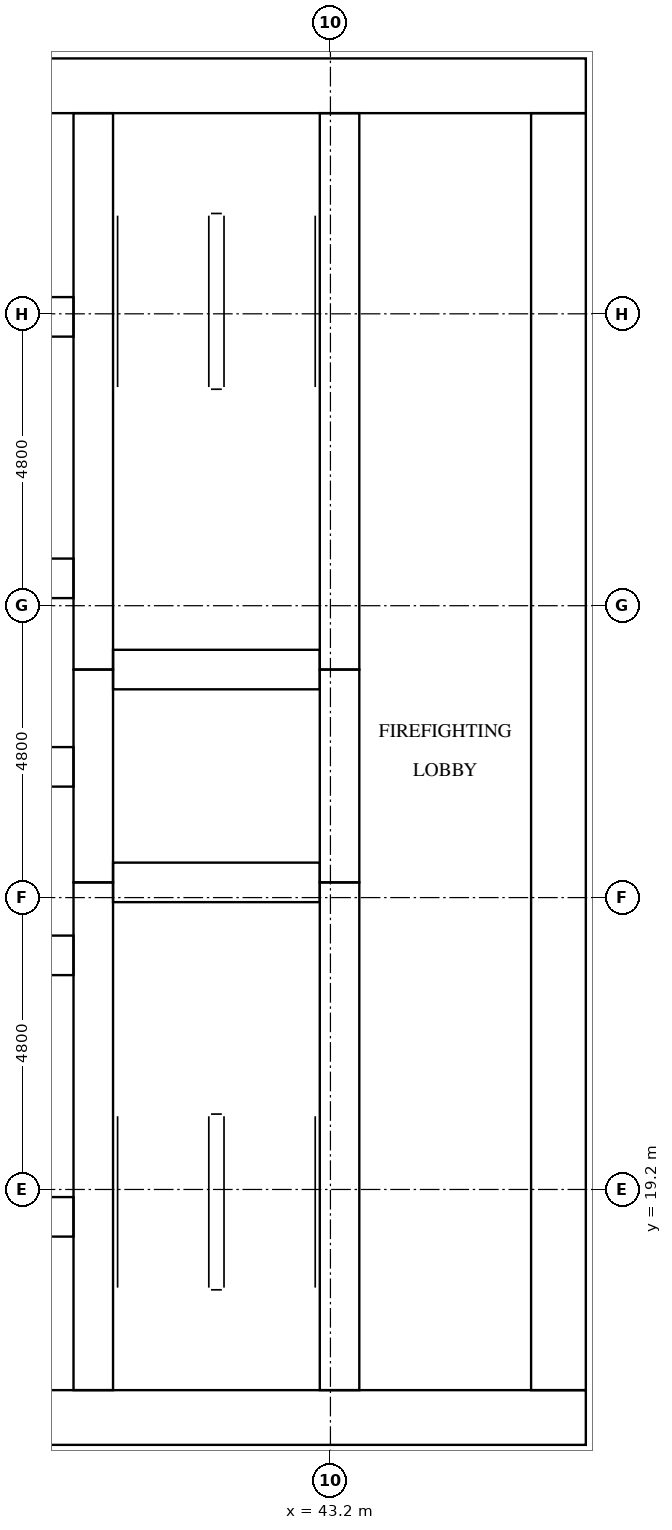
"""IFC4 building model, lengths in metres.
Left out: names, types, materials, properties, quantities, classifications, styles, units other than length and angle.
Written with IfcOpenShell. Run it as: python <this file> out.ifc"""

import sys

from ifc_helpers import new_model, si_unit, direction, frame, frame_2d, origin, place, context, subcontext, project, spatial, rectangle, extrude, element, fill, save


model = new_model("IFC4")
c1 = context("Model", 3, precision=1e-05, world=origin(), true_north=direction((0.0, 1.0)))
c2 = subcontext(c1, "Body", "Model", "MODEL_VIEW")
j1 = project(units=[si_unit("LENGTHUNIT", "METRE"), si_unit("PLANEANGLEUNIT", "RADIAN")], contexts=[c1])
p1 = place(None, origin())
s1 = spatial("IfcSite", under=j1, at=p1, CompositionType="ELEMENT")
p2 = place(p1, origin())
s2 = spatial("IfcBuilding", under=s1, at=p2, CompositionType="ELEMENT")
p3 = place(p2, frame((0.0, 0.0, 62.8)))
s3 = spatial("IfcBuildingStorey", under=s2, at=p3, CompositionType="ELEMENT", Elevation=62.8)
p4 = place(p3, frame((15.0, 15.45, 0.0), z_axis=(0.0, 0.0, 1.0), x_axis=(1.0, 0.0, 0.0)))
e1 = element("IfcWall", 1, at=p4, inside=s3, PredefinedType="SHEAR", context=c2, shape_type="SweptSolid", body=[
    extrude(rectangle(XDim=32.4, YDim=0.9, at=frame_2d((16.2, 0.0))), origin(), (0.0, 0.0, 1.0), 3.2),
])
p5 = place(p4, frame((15.3, 0.0, 0.0)))
e2 = element("IfcOpeningElement", 2, at=p5, cuts=e1, PredefinedType="OPENING", context=c2, shape_type="SweptSolid", body=[
    extrude(rectangle(XDim=1.8, YDim=2.1, at=frame_2d((0.9, 1.05))), frame((0.0, 0.46, 0.0), z_axis=(0.0, -1.0, 0.0), x_axis=(1.0, 0.0, 0.0)), (0.0, 0.0, 1.0), 0.92),
])
p6 = place(p3, frame((15.0, 37.35, 0.0), z_axis=(0.0, 0.0, 1.0), x_axis=(1.0, 0.0, 0.0)))
e3 = element("IfcWall", 3, at=p6, inside=s3, PredefinedType="SHEAR", context=c2, shape_type="SweptSolid", body=[
    extrude(rectangle(XDim=32.4, YDim=0.9, at=frame_2d((16.2, 0.0))), origin(), (0.0, 0.0, 1.0), 3.2),
])
p7 = place(p6, frame((15.3, 0.0, 0.0)))
e4 = element("IfcOpeningElement", 4, at=p7, cuts=e3, PredefinedType="OPENING", context=c2, shape_type="SweptSolid", body=[
    extrude(rectangle(XDim=1.8, YDim=2.1, at=frame_2d((0.9, 1.05))), frame((0.0, 0.46, 0.0), z_axis=(0.0, -1.0, 0.0), x_axis=(1.0, 0.0, 0.0)), (0.0, 0.0, 1.0), 0.92),
])
p8 = place(p6, frame((1.794, 0.0, 0.0)))
e5 = element("IfcOpeningElement", 5, at=p8, cuts=e3, PredefinedType="OPENING", context=c2, shape_type="SweptSolid", body=[
    extrude(rectangle(XDim=1.0, YDim=2.1, at=frame_2d((0.5, 1.05))), frame((0.0, 0.46, 0.0), z_axis=(0.0, -1.0, 0.0), x_axis=(1.0, 0.0, 0.0)), (0.0, 0.0, 1.0), 0.92),
])
p9 = place(p6, frame((5.331, 0.0, 0.0)))
e6 = element("IfcOpeningElement", 6, at=p9, cuts=e3, PredefinedType="OPENING", context=c2, shape_type="SweptSolid", body=[
    extrude(rectangle(XDim=1.0, YDim=2.1, at=frame_2d((0.5, 1.05))), frame((0.0, 0.46, 0.0), z_axis=(0.0, -1.0, 0.0), x_axis=(1.0, 0.0, 0.0)), (0.0, 0.0, 1.0), 0.92),
])
p10 = place(p3, frame((46.95, 15.9, 0.0), z_axis=(0.0, 0.0, 1.0), x_axis=(0.0, 1.0, 0.0)))
e7 = element("IfcWall", 7, at=p10, inside=s3, PredefinedType="SHEAR", context=c2, shape_type="SweptSolid", body=[
    extrude(rectangle(XDim=21.0, YDim=0.9, at=frame_2d((10.5, 0.0))), origin(), (0.0, 0.0, 1.0), 3.2),
])
p11 = place(p10, frame((10.2, 0.0, 0.0)))
e8 = element("IfcOpeningElement", 8, at=p11, cuts=e7, PredefinedType="OPENING", context=c2, shape_type="SweptSolid", body=[
    extrude(rectangle(XDim=1.2, YDim=2.1, at=frame_2d((0.6, 1.05))), frame((0.0, 0.46, 0.0), z_axis=(0.0, -1.0, 0.0), x_axis=(1.0, 0.0, 0.0)), (0.0, 0.0, 1.0), 0.92),
])
p12 = place(p3, frame((39.3, 15.9, 0.0), z_axis=(0.0, 0.0, 1.0), x_axis=(0.0, 1.0, 0.0)))
e9 = element("IfcWall", 9, at=p12, inside=s3, PredefinedType="SHEAR", context=c2, shape_type="SweptSolid", body=[
    extrude(rectangle(XDim=8.35, YDim=0.65, at=frame_2d((4.175, 0.0))), origin(), (0.0, 0.0, 1.0), 3.2),
])
p13 = place(p3, frame((39.3, 24.25, 0.0), z_axis=(0.0, 0.0, 1.0), x_axis=(0.0, 1.0, 0.0)))
e10 = element("IfcWall", 10, at=p13, inside=s3, PredefinedType="SHEAR", context=c2, shape_type="SweptSolid", body=[
    extrude(rectangle(XDim=3.5, YDim=0.65, at=frame_2d((1.75, 0.0))), origin(), (0.0, 0.0, 1.0), 3.2),
])
p14 = place(p3, frame((39.3, 27.75, 0.0), z_axis=(0.0, 0.0, 1.0), x_axis=(0.0, 1.0, 0.0)))
e11 = element("IfcWall", 11, at=p14, inside=s3, PredefinedType="SHEAR", context=c2, shape_type="SweptSolid", body=[
    extrude(rectangle(XDim=9.15, YDim=0.65, at=frame_2d((4.575, 0.0))), origin(), (0.0, 0.0, 1.0), 3.2),
])
p15 = place(p3, frame((43.35, 15.9, 0.0), z_axis=(0.0, 0.0, 1.0), x_axis=(0.0, 1.0, 0.0)))
e12 = element("IfcWall", 12, at=p15, inside=s3, PredefinedType="SHEAR", context=c2, shape_type="SweptSolid", body=[
    extrude(rectangle(XDim=8.35, YDim=0.65, at=frame_2d((4.175, 0.0))), origin(), (0.0, 0.0, 1.0), 3.2),
])
p16 = place(p15, frame((0.3, 0.0, 0.0)))
e13 = element("IfcOpeningElement", 13, at=p16, cuts=e12, PredefinedType="OPENING", context=c2, shape_type="SweptSolid", body=[
    extrude(rectangle(XDim=1.2, YDim=2.1, at=frame_2d((0.6, 1.05))), frame((0.0, 0.335, 0.0), z_axis=(0.0, -1.0, 0.0), x_axis=(1.0, 0.0, 0.0)), (0.0, 0.0, 1.0), 0.67),
])
p17 = place(p3, frame((43.35, 24.25, 0.0), z_axis=(0.0, 0.0, 1.0), x_axis=(0.0, 1.0, 0.0)))
e14 = element("IfcWall", 14, at=p17, inside=s3, PredefinedType="SHEAR", context=c2, shape_type="SweptSolid", body=[
    extrude(rectangle(XDim=3.5, YDim=0.65, at=frame_2d((1.75, 0.0))), origin(), (0.0, 0.0, 1.0), 3.2),
])
p18 = place(p17, frame((1.2, 0.0, 0.0)))
e15 = element("IfcOpeningElement", 15, at=p18, cuts=e14, PredefinedType="OPENING", context=c2, shape_type="SweptSolid", body=[
    extrude(rectangle(XDim=1.1, YDim=2.1, at=frame_2d((0.55, 1.05))), frame((0.0, 0.335, 0.0), z_axis=(0.0, -1.0, 0.0), x_axis=(1.0, 0.0, 0.0)), (0.0, 0.0, 1.0), 0.67),
])
p19 = place(p3, frame((43.35, 27.75, 0.0), z_axis=(0.0, 0.0, 1.0), x_axis=(0.0, 1.0, 0.0)))
e16 = element("IfcWall", 16, at=p19, inside=s3, PredefinedType="SHEAR", context=c2, shape_type="SweptSolid", body=[
    extrude(rectangle(XDim=9.15, YDim=0.65, at=frame_2d((4.575, 0.0))), origin(), (0.0, 0.0, 1.0), 3.2),
])
p20 = place(p19, frame((7.65, 0.0, 0.0)))
e17 = element("IfcOpeningElement", 17, at=p20, cuts=e16, PredefinedType="OPENING", context=c2, shape_type="SweptSolid", body=[
    extrude(rectangle(XDim=1.2, YDim=2.1, at=frame_2d((0.6, 1.05))), frame((0.0, 0.335, 0.0), z_axis=(0.0, -1.0, 0.0), x_axis=(1.0, 0.0, 0.0)), (0.0, 0.0, 1.0), 0.67),
])
for number, where, z_axis, x_axis in (
    (18, (39.625, 24.25, 0.0), (0.0, 0.0, 1.0), (1.0, 0.0, 0.0)),
    (19, (39.625, 27.75, 0.0), (0.0, 0.0, 1.0), (1.0, 0.0, 0.0)),
):
    element("IfcWall", number, at=place(p3, frame(where, z_axis=z_axis, x_axis=x_axis)), inside=s3, PredefinedType="SHEAR", context=c2, shape_type="SweptSolid", body=[
        extrude(rectangle(XDim=3.4, YDim=0.65, at=frame_2d((1.7, 0.0))), origin(), (0.0, 0.0, 1.0), 3.2),
    ])
p21 = place(p3, frame((33.375, 18.75, 0.0), z_axis=(0.0, 0.0, 1.0), x_axis=(1.0, 0.0, 0.0)))
e20 = element("IfcWall", 20, at=p21, inside=s3, PredefinedType="SHEAR", context=c2, shape_type="SweptSolid", body=[
    extrude(rectangle(XDim=5.6, YDim=0.65, at=frame_2d((2.8, 0.0))), origin(), (0.0, 0.0, 1.0), 3.2),
])
p22 = place(p21, frame((1.288, 0.0, 0.0)))
e21 = element("IfcOpeningElement", 21, at=p22, cuts=e20, PredefinedType="OPENING", context=c2, shape_type="SweptSolid", body=[
    extrude(rectangle(XDim=1.1, YDim=2.1, at=frame_2d((0.55, 1.05))), frame((0.0, 0.335, 0.0), z_axis=(0.0, -1.0, 0.0), x_axis=(1.0, 0.0, 0.0)), (0.0, 0.0, 1.0), 0.67),
])
p23 = place(p21, frame((3.863, 0.0, 0.0)))
e22 = element("IfcOpeningElement", 22, at=p23, cuts=e20, PredefinedType="OPENING", context=c2, shape_type="SweptSolid", body=[
    extrude(rectangle(XDim=1.1, YDim=2.1, at=frame_2d((0.55, 1.05))), frame((0.0, 0.335, 0.0), z_axis=(0.0, -1.0, 0.0), x_axis=(1.0, 0.0, 0.0)), (0.0, 0.0, 1.0), 0.67),
])
p24 = place(p3, frame((23.425, 23.05, 0.0), z_axis=(0.0, 0.0, 1.0), x_axis=(1.0, 0.0, 0.0)))
e23 = element("IfcWall", 23, at=p24, inside=s3, PredefinedType="SHEAR", context=c2, shape_type="SweptSolid", body=[
    extrude(rectangle(XDim=15.55, YDim=0.65, at=frame_2d((7.775, 0.0))), origin(), (0.0, 0.0, 1.0), 3.2),
])
p25 = place(p24, frame((0.663, 0.0, 0.0)))
e24 = element("IfcOpeningElement", 24, at=p25, cuts=e23, PredefinedType="OPENING", context=c2, shape_type="SweptSolid", body=[
    extrude(rectangle(XDim=1.1, YDim=2.1, at=frame_2d((0.55, 1.05))), frame((0.0, 0.335, 0.0), z_axis=(0.0, -1.0, 0.0), x_axis=(1.0, 0.0, 0.0)), (0.0, 0.0, 1.0), 0.67),
])
p26 = place(p24, frame((3.288, 0.0, 0.0)))
e25 = element("IfcOpeningElement", 25, at=p26, cuts=e23, PredefinedType="OPENING", context=c2, shape_type="SweptSolid", body=[
    extrude(rectangle(XDim=1.1, YDim=2.1, at=frame_2d((0.55, 1.05))), frame((0.0, 0.335, 0.0), z_axis=(0.0, -1.0, 0.0), x_axis=(1.0, 0.0, 0.0)), (0.0, 0.0, 1.0), 0.67),
])
p27 = place(p24, frame((12.525, 0.0, 0.0)))
e26 = element("IfcOpeningElement", 26, at=p27, cuts=e23, PredefinedType="OPENING", context=c2, shape_type="SweptSolid", body=[
    extrude(rectangle(XDim=1.0, YDim=2.1, at=frame_2d((0.5, 1.05))), frame((0.0, 0.335, 0.0), z_axis=(0.0, -1.0, 0.0), x_axis=(1.0, 0.0, 0.0)), (0.0, 0.0, 1.0), 0.67),
])
p28 = place(p3, frame((23.425, 26.15, 0.0), z_axis=(0.0, 0.0, 1.0), x_axis=(1.0, 0.0, 0.0)))
e27 = element("IfcWall", 27, at=p28, inside=s3, PredefinedType="SHEAR", context=c2, shape_type="SweptSolid", body=[
    extrude(rectangle(XDim=15.55, YDim=0.65, at=frame_2d((7.775, 0.0))), origin(), (0.0, 0.0, 1.0), 3.2),
])
p29 = place(p3, frame((23.425, 29.25, 0.0), z_axis=(0.0, 0.0, 1.0), x_axis=(1.0, 0.0, 0.0)))
e28 = element("IfcWall", 28, at=p29, inside=s3, PredefinedType="SHEAR", context=c2, shape_type="SweptSolid", body=[
    extrude(rectangle(XDim=15.55, YDim=0.65, at=frame_2d((7.775, 0.0))), origin(), (0.0, 0.0, 1.0), 3.2),
])
p30 = place(p29, frame((3.337, 0.0, 0.0)))
e29 = element("IfcOpeningElement", 29, at=p30, cuts=e28, PredefinedType="OPENING", context=c2, shape_type="SweptSolid", body=[
    extrude(rectangle(XDim=1.0, YDim=2.1, at=frame_2d((0.5, 1.05))), frame((0.0, 0.335, 0.0), z_axis=(0.0, -1.0, 0.0), x_axis=(1.0, 0.0, 0.0)), (0.0, 0.0, 1.0), 0.67),
])
p31 = place(p29, frame((11.212, 0.0, 0.0)))
e30 = element("IfcOpeningElement", 30, at=p31, cuts=e28, PredefinedType="OPENING", context=c2, shape_type="SweptSolid", body=[
    extrude(rectangle(XDim=1.0, YDim=2.1, at=frame_2d((0.5, 1.05))), frame((0.0, 0.335, 0.0), z_axis=(0.0, -1.0, 0.0), x_axis=(1.0, 0.0, 0.0)), (0.0, 0.0, 1.0), 0.67),
])
p32 = place(p3, frame((33.375, 33.55, 0.0), z_axis=(0.0, 0.0, 1.0), x_axis=(1.0, 0.0, 0.0)))
e31 = element("IfcWall", 31, at=p32, inside=s3, PredefinedType="SHEAR", context=c2, shape_type="SweptSolid", body=[
    extrude(rectangle(XDim=5.6, YDim=0.65, at=frame_2d((2.8, 0.0))), origin(), (0.0, 0.0, 1.0), 3.2),
])
p33 = place(p18, origin())
e32 = element("IfcDoor", 32, at=p33, inside=s3, OperationType="DOUBLE_DOOR_SLIDING", PredefinedType="DOOR", context=c2, shape_type="SweptSolid", body=[
    extrude(rectangle(XDim=1.1, YDim=2.1, at=frame_2d((0.55, 1.05))), frame((0.0, 0.025, 0.0), z_axis=(0.0, -1.0, 0.0), x_axis=(1.0, 0.0, 0.0)), (0.0, 0.0, 1.0), 0.05),
])
fill(e15, e32)
p34 = place(p16, origin())
e33 = element("IfcDoor", 33, at=p34, inside=s3, OperationType="SINGLE_SWING_RIGHT", PredefinedType="DOOR", context=c2, shape_type="SweptSolid", body=[
    extrude(rectangle(XDim=1.2, YDim=2.1, at=frame_2d((0.6, 1.05))), frame((0.0, 0.025, 0.0), z_axis=(0.0, -1.0, 0.0), x_axis=(1.0, 0.0, 0.0)), (0.0, 0.0, 1.0), 0.05),
])
fill(e13, e33)
p35 = place(p20, origin())
e34 = element("IfcDoor", 34, at=p35, inside=s3, OperationType="SINGLE_SWING_LEFT", PredefinedType="DOOR", context=c2, shape_type="SweptSolid", body=[
    extrude(rectangle(XDim=1.2, YDim=2.1, at=frame_2d((0.6, 1.05))), frame((0.0, 0.025, 0.0), z_axis=(0.0, -1.0, 0.0), x_axis=(1.0, 0.0, 0.0)), (0.0, 0.0, 1.0), 0.05),
])
fill(e17, e34)
p36 = place(p11, origin())
e35 = element("IfcDoor", 35, at=p36, inside=s3, OperationType="SINGLE_SWING_LEFT", PredefinedType="DOOR", context=c2, shape_type="SweptSolid", body=[
    extrude(rectangle(XDim=1.2, YDim=2.1, at=frame_2d((0.6, 1.05))), frame((0.0, 0.025, 0.0), z_axis=(0.0, -1.0, 0.0), x_axis=(1.0, 0.0, 0.0)), (0.0, 0.0, 1.0), 0.05),
])
fill(e8, e35)
save(model, sys.argv[1])
